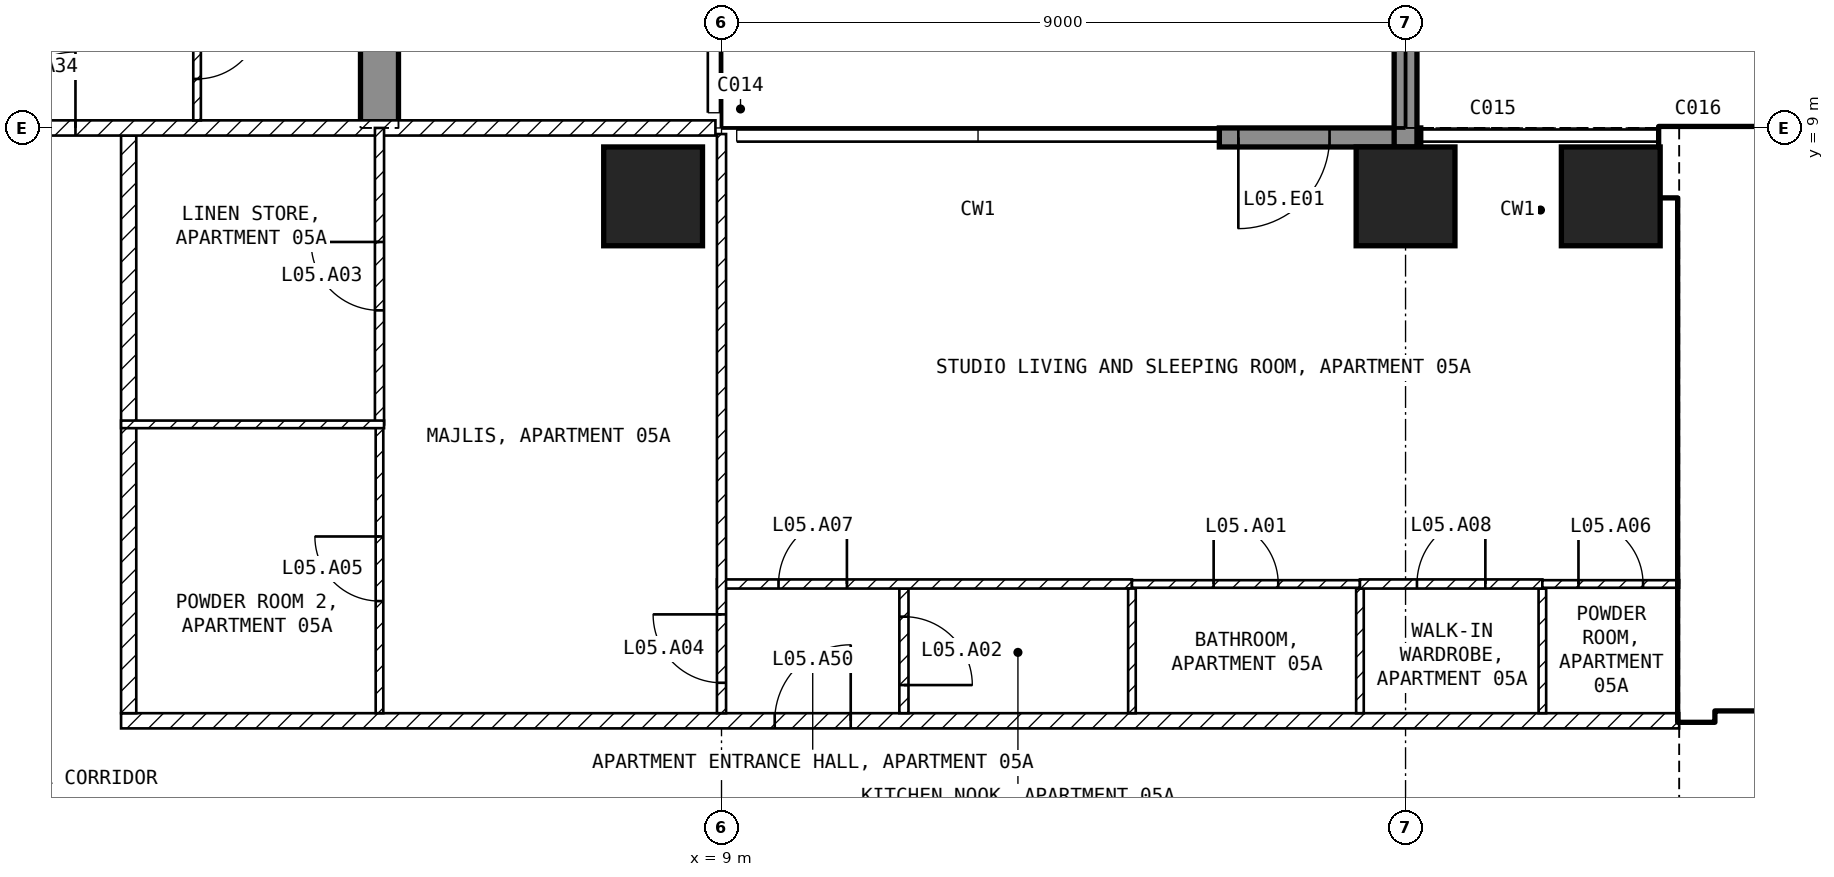
"""IFC4 building model, lengths in metres.
Left out: names, types, materials, properties, quantities, classifications, styles, units other than length and angle.
Written with IfcOpenShell. Run it as: python <this file> out.ifc"""

import sys

from ifc_helpers import new_model, si_unit, direction, frame, frame_2d, origin, origin_2d, place, context, subcontext, project, spatial, polyline, rectangle, outline, extrude, element, fill, save


model = new_model("IFC4")
c1 = context("Model", 3, precision=1e-05, world=origin(), true_north=direction((0.0, 1.0)))
c2 = subcontext(c1, "Body", "Model", "MODEL_VIEW")
j1 = project(units=[si_unit("LENGTHUNIT", "METRE"), si_unit("PLANEANGLEUNIT", "RADIAN")], contexts=[c1])
p1 = place(None, origin())
s1 = spatial("IfcSite", under=j1, at=p1, CompositionType="ELEMENT")
p2 = place(p1, origin())
s2 = spatial("IfcBuilding", under=s1, at=p2, CompositionType="ELEMENT")
p3 = place(p2, frame((0.0, 0.0, 36.5)))
s3 = spatial("IfcBuildingStorey", under=s2, at=p3, CompositionType="ELEMENT", Elevation=36.5)
for number, where, z_axis, x_axis in (
    (1, (8.1, 8.1, -0.25), (0.0, 0.0, 1.0), (1.0, 0.0, 0.0)),
    (2, (18.0, 8.1, -0.25), (0.0, 0.0, 1.0), (1.0, 0.0, 0.0)),
    (3, (20.7, 8.1, -0.25), (0.0, 0.0, 1.0), (1.0, 0.0, 0.0)),
):
    element("IfcColumn", number, at=place(p3, frame(where, z_axis=z_axis, x_axis=x_axis)), inside=s3, PredefinedType="COLUMN", context=c2, shape_type="SweptSolid", body=[
        extrude(rectangle(XDim=1.3, YDim=1.3, at=origin_2d()), origin(), (0.0, 0.0, 1.0), 3.5),
    ])
p4 = place(p3, frame((4.25, 9.0, -0.25), z_axis=(1.0, 0.0, 0.0), x_axis=(0.0, 1.0, 0.0)))
e4 = element("IfcWall", 4, at=p4, inside=s3, PredefinedType="SHEAR", context=c2, shape_type="SweptSolid", body=[
    extrude(outline(polyline([(0.0, 0.0), (2.1, 0.0), (2.1, 2.65), (4.5, 2.65), (4.5, 0.0), (9.9, 0.0), (9.9, 2.65), (12.3, 2.65), (12.3, 0.0), (16.45, 0.0), (16.45, 3.5), (0.0, 3.5), (0.0, 0.0)])), origin(), (0.0, 0.0, 1.0), 0.5),
])
p5 = place(p3, frame((18.2, 8.875, 0.0), z_axis=(0.0, 0.0, 1.0), x_axis=(-1.0, 0.0, 0.0)))
e5 = element("IfcWall", 5, at=p5, inside=s3, PredefinedType="SOLIDWALL", context=c2, shape_type="SweptSolid", body=[
    extrude(rectangle(XDim=2.65, YDim=0.25, at=frame_2d((1.325, 0.0))), origin(), (0.0, 0.0, 1.0), 3.25),
])
p6 = place(p5, frame((1.2, 0.0, 0.0)))
e6 = element("IfcOpeningElement", 6, at=p6, cuts=e5, PredefinedType="OPENING", context=c2, shape_type="SweptSolid", body=[
    extrude(rectangle(XDim=1.2, YDim=2.4, at=frame_2d((0.6, 1.2))), frame((0.0, 0.135, 0.0), z_axis=(0.0, -1.0, 0.0), x_axis=(1.0, 0.0, 0.0)), (0.0, 0.0, 1.0), 0.27),
])
p7 = place(p3, frame((18.0, 8.75, 0.0), z_axis=(0.0, 0.0, 1.0), x_axis=(0.0, 1.0, 0.0)))
e7 = element("IfcWall", 7, at=p7, inside=s3, PredefinedType="SOLIDWALL", context=c2, shape_type="SweptSolid", body=[
    extrude(rectangle(XDim=2.95, YDim=0.3, at=frame_2d((1.475, 0.0))), origin(), (0.0, 0.0, 1.0), 3.25),
])
p8 = place(p3, frame((21.35, 8.55, 0.0), z_axis=(0.0, 0.0, 1.0), x_axis=(1.0, 0.0, 0.0)))
e8 = element("IfcWall", 8, at=p8, inside=s3, PredefinedType="SHEAR", context=c2, shape_type="SweptSolid", body=[
    extrude(rectangle(XDim=10.15, YDim=0.9, at=frame_2d((5.075, 0.0))), origin(), (0.0, 0.0, 1.0), 3.25),
])
p9 = place(p3, frame((21.825, 1.2, 0.0), z_axis=(0.0, 0.0, 1.0), x_axis=(0.0, 1.0, 0.0)))
e9 = element("IfcWall", 9, at=p9, inside=s3, PredefinedType="SHEAR", context=c2, shape_type="SweptSolid", body=[
    extrude(rectangle(XDim=6.9, YDim=0.45, at=frame_2d((3.45, 0.0))), origin(), (0.0, 0.0, 1.0), 3.25),
])
p10 = place(p3, frame((22.05, 1.45, 0.0), z_axis=(0.0, 0.0, 1.0), x_axis=(1.0, 0.0, 0.0)))
e10 = element("IfcWall", 10, at=p10, inside=s3, PredefinedType="SOLIDWALL", context=c2, shape_type="SweptSolid", body=[
    extrude(rectangle(XDim=13.05, YDim=0.2, at=frame_2d((6.525, 0.0))), origin(), (0.0, 0.0, 1.0), 3.25),
])
p11 = place(p10, frame((0.75, 0.0, 0.0)))
e11 = element("IfcOpeningElement", 11, at=p11, cuts=e10, PredefinedType="OPENING", context=c2, shape_type="SweptSolid", body=[
    extrude(rectangle(XDim=1.0, YDim=2.1, at=frame_2d((0.5, 1.05))), frame((0.0, 0.11, 0.0), z_axis=(0.0, -1.0, 0.0), x_axis=(1.0, 0.0, 0.0)), (0.0, 0.0, 1.0), 0.22),
])
p12 = place(p10, frame((3.25, 0.0, 0.0)))
e12 = element("IfcOpeningElement", 12, at=p12, cuts=e10, PredefinedType="OPENING", context=c2, shape_type="SweptSolid", body=[
    extrude(rectangle(XDim=1.0, YDim=2.1, at=frame_2d((0.5, 1.05))), frame((0.0, 0.11, 0.0), z_axis=(0.0, -1.0, 0.0), x_axis=(1.0, 0.0, 0.0)), (0.0, 0.0, 1.0), 0.22),
])
p13 = place(p3, frame((22.05, 5.15, 0.0), z_axis=(0.0, 0.0, 1.0), x_axis=(1.0, 0.0, 0.0)))
e13 = element("IfcWall", 13, at=p13, inside=s3, PredefinedType="SOLIDWALL", context=c2, shape_type="SweptSolid", body=[
    extrude(rectangle(XDim=6.3, YDim=0.2, at=frame_2d((3.15, 0.0))), origin(), (0.0, 0.0, 1.0), 3.25),
])
p14 = place(p13, frame((0.2, 0.0, 0.0)))
e14 = element("IfcOpeningElement", 14, at=p14, cuts=e13, PredefinedType="OPENING", context=c2, shape_type="SweptSolid", body=[
    extrude(rectangle(XDim=1.0, YDim=2.1, at=frame_2d((0.5, 1.05))), frame((0.0, 0.11, 0.0), z_axis=(0.0, -1.0, 0.0), x_axis=(1.0, 0.0, 0.0)), (0.0, 0.0, 1.0), 0.22),
])
p15 = place(p3, frame((1.1, 1.2, 0.0), z_axis=(0.0, 0.0, 1.0), x_axis=(1.0, 0.0, 0.0)))
e15 = element("IfcWall", 15, at=p15, inside=s3, PredefinedType="PARTITIONING", context=c2, shape_type="SweptSolid", body=[
    extrude(rectangle(XDim=20.5, YDim=0.2, at=frame_2d((10.25, 0.0))), origin(), (0.0, 0.0, 1.0), 3.25),
])
p16 = place(p15, frame((8.6, 0.0, 0.0)))
e16 = element("IfcOpeningElement", 16, at=p16, cuts=e15, PredefinedType="OPENING", context=c2, shape_type="SweptSolid", body=[
    extrude(rectangle(XDim=1.0, YDim=2.1, at=frame_2d((0.5, 1.05))), frame((0.0, 0.11, 0.0), z_axis=(0.0, -1.0, 0.0), x_axis=(1.0, 0.0, 0.0)), (0.0, 0.0, 1.0), 0.22),
])
p17 = place(p3, frame((1.2, 8.9, 0.0), z_axis=(0.0, 0.0, 1.0), x_axis=(0.0, -1.0, 0.0)))
e17 = element("IfcWall", 17, at=p17, inside=s3, PredefinedType="PARTITIONING", context=c2, shape_type="SweptSolid", body=[
    extrude(rectangle(XDim=7.6, YDim=0.2, at=frame_2d((3.8, 0.0))), origin(), (0.0, 0.0, 1.0), 3.25),
])
p18 = place(p3, frame((-8.92, 9.0, 0.0), z_axis=(0.0, 0.0, 1.0), x_axis=(1.0, 0.0, 0.0)))
e18 = element("IfcWall", 18, at=p18, inside=s3, PredefinedType="PARTITIONING", context=c2, shape_type="SweptSolid", body=[
    extrude(rectangle(XDim=17.84, YDim=0.2, at=frame_2d((8.92, 0.0))), origin(), (0.0, 0.0, 1.0), 3.25),
])
p19 = place(p18, frame((8.42, 0.0, 0.0)))
e19 = element("IfcOpeningElement", 19, at=p19, cuts=e18, PredefinedType="OPENING", context=c2, shape_type="SweptSolid", body=[
    extrude(rectangle(XDim=1.0, YDim=2.1, at=frame_2d((0.5, 1.05))), frame((0.0, 0.11, 0.0), z_axis=(0.0, -1.0, 0.0), x_axis=(1.0, 0.0, 0.0)), (0.0, 0.0, 1.0), 0.22),
])
p20 = place(p3, frame((11.4, 2.94, 0.0), z_axis=(0.0, 0.0, 1.0), x_axis=(0.0, -1.0, 0.0)))
e20 = element("IfcWall", 20, at=p20, inside=s3, PredefinedType="PARTITIONING", context=c2, shape_type="SweptSolid", body=[
    extrude(rectangle(XDim=1.64, YDim=0.12, at=frame_2d((0.82, 0.0))), origin(), (0.0, 0.0, 1.0), 3.25),
])
p21 = place(p20, frame((0.37, 0.0, 0.0)))
e21 = element("IfcOpeningElement", 21, at=p21, cuts=e20, PredefinedType="OPENING", context=c2, shape_type="SweptSolid", body=[
    extrude(rectangle(XDim=0.9, YDim=2.1, at=frame_2d((0.45, 1.05))), frame((0.0, 0.07, 0.0), z_axis=(0.0, -1.0, 0.0), x_axis=(1.0, 0.0, 0.0)), (0.0, 0.0, 1.0), 0.14),
])
p22 = place(p3, frame((8.94, 3.0, 0.0), z_axis=(0.0, 0.0, 1.0), x_axis=(1.0, 0.0, 0.0)))
e22 = element("IfcWall", 22, at=p22, inside=s3, PredefinedType="PARTITIONING", context=c2, shape_type="SweptSolid", body=[
    extrude(rectangle(XDim=5.46, YDim=0.12, at=frame_2d((2.73, 0.0))), origin(), (0.0, 0.0, 1.0), 3.25),
])
p23 = place(p22, frame((0.81, 0.0, 0.0)))
e23 = element("IfcOpeningElement", 23, at=p23, cuts=e22, PredefinedType="OPENING", context=c2, shape_type="SweptSolid", body=[
    extrude(rectangle(XDim=0.9, YDim=2.1, at=frame_2d((0.45, 1.05))), frame((0.0, 0.07, 0.0), z_axis=(0.0, -1.0, 0.0), x_axis=(1.0, 0.0, 0.0)), (0.0, 0.0, 1.0), 0.14),
])
p24 = place(p3, frame((9.0, 1.3, 0.0), z_axis=(0.0, 0.0, 1.0), x_axis=(0.0, 1.0, 0.0)))
e24 = element("IfcWall", 24, at=p24, inside=s3, PredefinedType="PARTITIONING", context=c2, shape_type="SweptSolid", body=[
    extrude(rectangle(XDim=7.62, YDim=0.12, at=frame_2d((3.81, 0.0))), origin(), (0.0, 0.0, 1.0), 3.25),
])
p25 = place(p24, frame((0.4, 0.0, 0.0)))
e25 = element("IfcOpeningElement", 25, at=p25, cuts=e24, PredefinedType="OPENING", context=c2, shape_type="SweptSolid", body=[
    extrude(rectangle(XDim=0.9, YDim=2.1, at=frame_2d((0.45, 1.05))), frame((0.0, 0.07, 0.0), z_axis=(0.0, -1.0, 0.0), x_axis=(1.0, 0.0, 0.0)), (0.0, 0.0, 1.0), 0.14),
])
for number, where, z_axis, x_axis in (
    (26, (14.4, 2.94, 0.0), (0.0, 0.0, 1.0), (0.0, -1.0, 0.0)),
    (27, (17.4, 2.94, 0.0), (0.0, 0.0, 1.0), (0.0, -1.0, 0.0)),
):
    element("IfcWall", number, at=place(p3, frame(where, z_axis=z_axis, x_axis=x_axis)), inside=s3, PredefinedType="PARTITIONING", context=c2, shape_type="SweptSolid", body=[
        extrude(rectangle(XDim=1.64, YDim=0.1, at=frame_2d((0.82, 0.0))), origin(), (0.0, 0.0, 1.0), 3.25),
    ])
p26 = place(p3, frame((14.4, 3.0, 0.0), z_axis=(0.0, 0.0, 1.0), x_axis=(1.0, 0.0, 0.0)))
e28 = element("IfcWall", 28, at=p26, inside=s3, PredefinedType="PARTITIONING", context=c2, shape_type="SweptSolid", body=[
    extrude(rectangle(XDim=3.0, YDim=0.1, at=frame_2d((1.5, 0.0))), origin(), (0.0, 0.0, 1.0), 3.25),
])
p27 = place(p26, frame((1.075, 0.0, 0.0)))
e29 = element("IfcOpeningElement", 29, at=p27, cuts=e28, PredefinedType="OPENING", context=c2, shape_type="SweptSolid", body=[
    extrude(rectangle(XDim=0.85, YDim=2.1, at=frame_2d((0.425, 1.05))), frame((0.0, 0.06, 0.0), z_axis=(0.0, -1.0, 0.0), x_axis=(1.0, 0.0, 0.0)), (0.0, 0.0, 1.0), 0.12),
])
p28 = place(p3, frame((19.8, 2.94, 0.0), z_axis=(0.0, 0.0, 1.0), x_axis=(0.0, -1.0, 0.0)))
e30 = element("IfcWall", 30, at=p28, inside=s3, PredefinedType="PARTITIONING", context=c2, shape_type="SweptSolid", body=[
    extrude(rectangle(XDim=1.64, YDim=0.1, at=frame_2d((0.82, 0.0))), origin(), (0.0, 0.0, 1.0), 3.25),
])
p29 = place(p3, frame((17.4, 3.0, 0.0), z_axis=(0.0, 0.0, 1.0), x_axis=(1.0, 0.0, 0.0)))
e31 = element("IfcWall", 31, at=p29, inside=s3, PredefinedType="PARTITIONING", context=c2, shape_type="SweptSolid", body=[
    extrude(rectangle(XDim=2.4, YDim=0.12, at=frame_2d((1.2, 0.0))), origin(), (0.0, 0.0, 1.0), 3.25),
])
p30 = place(p29, frame((0.75, 0.0, 0.0)))
e32 = element("IfcOpeningElement", 32, at=p30, cuts=e31, PredefinedType="OPENING", context=c2, shape_type="SweptSolid", body=[
    extrude(rectangle(XDim=0.9, YDim=2.1, at=frame_2d((0.45, 1.05))), frame((0.0, 0.07, 0.0), z_axis=(0.0, -1.0, 0.0), x_axis=(1.0, 0.0, 0.0)), (0.0, 0.0, 1.0), 0.14),
])
p31 = place(p3, frame((19.8, 3.0, 0.0), z_axis=(0.0, 0.0, 1.0), x_axis=(1.0, 0.0, 0.0)))
e33 = element("IfcWall", 33, at=p31, inside=s3, PredefinedType="PARTITIONING", context=c2, shape_type="SweptSolid", body=[
    extrude(rectangle(XDim=1.8, YDim=0.1, at=frame_2d((0.9, 0.0))), origin(), (0.0, 0.0, 1.0), 3.25),
])
p32 = place(p31, frame((0.475, 0.0, 0.0)))
e34 = element("IfcOpeningElement", 34, at=p32, cuts=e33, PredefinedType="OPENING", context=c2, shape_type="SweptSolid", body=[
    extrude(rectangle(XDim=0.85, YDim=2.1, at=frame_2d((0.425, 1.05))), frame((0.0, 0.06, 0.0), z_axis=(0.0, -1.0, 0.0), x_axis=(1.0, 0.0, 0.0)), (0.0, 0.0, 1.0), 0.12),
])
p33 = place(p3, frame((4.5, 1.3, 0.0), z_axis=(0.0, 0.0, 1.0), x_axis=(0.0, 1.0, 0.0)))
e35 = element("IfcWall", 35, at=p33, inside=s3, PredefinedType="PARTITIONING", context=c2, shape_type="SweptSolid", body=[
    extrude(rectangle(XDim=3.8, YDim=0.1, at=frame_2d((1.9, 0.0))), origin(), (0.0, 0.0, 1.0), 3.25),
])
p34 = place(p33, frame((1.475, 0.0, 0.0)))
e36 = element("IfcOpeningElement", 36, at=p34, cuts=e35, PredefinedType="OPENING", context=c2, shape_type="SweptSolid", body=[
    extrude(rectangle(XDim=0.85, YDim=2.1, at=frame_2d((0.425, 1.05))), frame((0.0, 0.06, 0.0), z_axis=(0.0, -1.0, 0.0), x_axis=(1.0, 0.0, 0.0)), (0.0, 0.0, 1.0), 0.12),
])
p35 = place(p3, frame((4.5, 5.1, 0.0), z_axis=(0.0, 0.0, 1.0), x_axis=(0.0, 1.0, 0.0)))
e37 = element("IfcWall", 37, at=p35, inside=s3, PredefinedType="PARTITIONING", context=c2, shape_type="SweptSolid", body=[
    extrude(rectangle(XDim=3.9, YDim=0.12, at=frame_2d((1.95, 0.0))), origin(), (0.0, 0.0, 1.0), 3.25),
])
p36 = place(p35, frame((1.5, 0.0, 0.0)))
e38 = element("IfcOpeningElement", 38, at=p36, cuts=e37, PredefinedType="OPENING", context=c2, shape_type="SweptSolid", body=[
    extrude(rectangle(XDim=0.9, YDim=2.1, at=frame_2d((0.45, 1.05))), frame((0.0, 0.07, 0.0), z_axis=(0.0, -1.0, 0.0), x_axis=(1.0, 0.0, 0.0)), (0.0, 0.0, 1.0), 0.14),
])
p37 = place(p3, frame((1.1, 5.1, 0.0), z_axis=(0.0, 0.0, 1.0), x_axis=(1.0, 0.0, 0.0)))
e39 = element("IfcWall", 39, at=p37, inside=s3, PredefinedType="PARTITIONING", context=c2, shape_type="SweptSolid", body=[
    extrude(rectangle(XDim=3.46, YDim=0.1, at=frame_2d((1.73, 0.0))), origin(), (0.0, 0.0, 1.0), 3.25),
])
p38 = place(p3, frame((2.1, 11.04, 0.0), z_axis=(0.0, 0.0, 1.0), x_axis=(0.0, -1.0, 0.0)))
e40 = element("IfcWall", 40, at=p38, inside=s3, PredefinedType="PARTITIONING", context=c2, shape_type="SweptSolid", body=[
    extrude(rectangle(XDim=1.94, YDim=0.1, at=frame_2d((0.97, 0.0))), origin(), (0.0, 0.0, 1.0), 3.25),
])
p39 = place(p38, frame((0.545, 0.0, 0.0)))
e41 = element("IfcOpeningElement", 41, at=p39, cuts=e40, PredefinedType="OPENING", context=c2, shape_type="SweptSolid", body=[
    extrude(rectangle(XDim=0.85, YDim=2.1, at=frame_2d((0.425, 1.05))), frame((0.0, 0.06, 0.0), z_axis=(0.0, -1.0, 0.0), x_axis=(1.0, 0.0, 0.0)), (0.0, 0.0, 1.0), 0.12),
])
p40 = place(p6, origin())
e42 = element("IfcDoor", 42, at=p40, inside=s3, OperationType="SINGLE_SWING_RIGHT", PredefinedType="DOOR", context=c2, shape_type="SweptSolid", body=[
    extrude(rectangle(XDim=1.2, YDim=2.4, at=frame_2d((0.6, 1.2))), frame((0.0, 0.025, 0.0), z_axis=(0.0, -1.0, 0.0), x_axis=(1.0, 0.0, 0.0)), (0.0, 0.0, 1.0), 0.05),
])
fill(e6, e42)
p41 = place(p14, origin())
e43 = element("IfcDoor", 43, at=p41, inside=s3, OperationType="SINGLE_SWING_LEFT", PredefinedType="DOOR", context=c2, shape_type="SweptSolid", body=[
    extrude(rectangle(XDim=1.0, YDim=2.1, at=frame_2d((0.5, 1.05))), frame((0.0, 0.025, 0.0), z_axis=(0.0, -1.0, 0.0), x_axis=(1.0, 0.0, 0.0)), (0.0, 0.0, 1.0), 0.05),
])
fill(e14, e43)
p42 = place(p27, origin())
e44 = element("IfcDoor", 44, at=p42, inside=s3, OperationType="SINGLE_SWING_LEFT", PredefinedType="DOOR", context=c2, shape_type="SweptSolid", body=[
    extrude(rectangle(XDim=0.85, YDim=2.1, at=frame_2d((0.425, 1.05))), frame((0.0, 0.025, 0.0), z_axis=(0.0, -1.0, 0.0), x_axis=(1.0, 0.0, 0.0)), (0.0, 0.0, 1.0), 0.05),
])
fill(e29, e44)
p43 = place(p21, origin())
e45 = element("IfcDoor", 45, at=p43, inside=s3, OperationType="SINGLE_SWING_RIGHT", PredefinedType="DOOR", context=c2, shape_type="SweptSolid", body=[
    extrude(rectangle(XDim=0.9, YDim=2.1, at=frame_2d((0.45, 1.05))), frame((0.0, 0.025, 0.0), z_axis=(0.0, -1.0, 0.0), x_axis=(1.0, 0.0, 0.0)), (0.0, 0.0, 1.0), 0.05),
])
fill(e21, e45)
p44 = place(p36, origin())
e46 = element("IfcDoor", 46, at=p44, inside=s3, OperationType="SINGLE_SWING_RIGHT", PredefinedType="DOOR", context=c2, shape_type="SweptSolid", body=[
    extrude(rectangle(XDim=0.9, YDim=2.1, at=frame_2d((0.45, 1.05))), frame((0.0, 0.025, 0.0), z_axis=(0.0, -1.0, 0.0), x_axis=(1.0, 0.0, 0.0)), (0.0, 0.0, 1.0), 0.05),
])
fill(e38, e46)
p45 = place(p25, origin())
e47 = element("IfcDoor", 47, at=p45, inside=s3, OperationType="SINGLE_SWING_RIGHT", PredefinedType="DOOR", context=c2, shape_type="SweptSolid", body=[
    extrude(rectangle(XDim=0.9, YDim=2.1, at=frame_2d((0.45, 1.05))), frame((0.0, 0.025, 0.0), z_axis=(0.0, -1.0, 0.0), x_axis=(1.0, 0.0, 0.0)), (0.0, 0.0, 1.0), 0.05),
])
fill(e25, e47)
p46 = place(p34, origin())
e48 = element("IfcDoor", 48, at=p46, inside=s3, OperationType="SINGLE_SWING_RIGHT", PredefinedType="DOOR", context=c2, shape_type="SweptSolid", body=[
    extrude(rectangle(XDim=0.85, YDim=2.1, at=frame_2d((0.425, 1.05))), frame((0.0, 0.025, 0.0), z_axis=(0.0, -1.0, 0.0), x_axis=(1.0, 0.0, 0.0)), (0.0, 0.0, 1.0), 0.05),
])
fill(e36, e48)
p47 = place(p32, origin())
e49 = element("IfcDoor", 49, at=p47, inside=s3, OperationType="SINGLE_SWING_LEFT", PredefinedType="DOOR", context=c2, shape_type="SweptSolid", body=[
    extrude(rectangle(XDim=0.85, YDim=2.1, at=frame_2d((0.425, 1.05))), frame((0.0, 0.025, 0.0), z_axis=(0.0, -1.0, 0.0), x_axis=(1.0, 0.0, 0.0)), (0.0, 0.0, 1.0), 0.05),
])
fill(e34, e49)
p48 = place(p23, origin())
e50 = element("IfcDoor", 50, at=p48, inside=s3, OperationType="SINGLE_SWING_RIGHT", PredefinedType="DOOR", context=c2, shape_type="SweptSolid", body=[
    extrude(rectangle(XDim=0.9, YDim=2.1, at=frame_2d((0.45, 1.05))), frame((0.0, 0.025, 0.0), z_axis=(0.0, -1.0, 0.0), x_axis=(1.0, 0.0, 0.0)), (0.0, 0.0, 1.0), 0.05),
])
fill(e23, e50)
p49 = place(p30, origin())
e51 = element("IfcDoor", 51, at=p49, inside=s3, OperationType="SINGLE_SWING_RIGHT", PredefinedType="DOOR", context=c2, shape_type="SweptSolid", body=[
    extrude(rectangle(XDim=0.9, YDim=2.1, at=frame_2d((0.45, 1.05))), frame((0.0, 0.025, 0.0), z_axis=(0.0, -1.0, 0.0), x_axis=(1.0, 0.0, 0.0)), (0.0, 0.0, 1.0), 0.05),
])
fill(e32, e51)
p50 = place(p19, origin())
e52 = element("IfcDoor", 52, at=p50, inside=s3, OperationType="SINGLE_SWING_RIGHT", PredefinedType="DOOR", context=c2, shape_type="SweptSolid", body=[
    extrude(rectangle(XDim=1.0, YDim=2.1, at=frame_2d((0.5, 1.05))), frame((0.0, 0.025, 0.0), z_axis=(0.0, -1.0, 0.0), x_axis=(1.0, 0.0, 0.0)), (0.0, 0.0, 1.0), 0.05),
])
fill(e19, e52)
p51 = place(p39, origin())
e53 = element("IfcDoor", 53, at=p51, inside=s3, OperationType="SINGLE_SWING_LEFT", PredefinedType="DOOR", context=c2, shape_type="SweptSolid", body=[
    extrude(rectangle(XDim=0.85, YDim=2.1, at=frame_2d((0.425, 1.05))), frame((0.0, 0.025, 0.0), z_axis=(0.0, -1.0, 0.0), x_axis=(1.0, 0.0, 0.0)), (0.0, 0.0, 1.0), 0.05),
])
fill(e41, e53)
p52 = place(p16, origin())
e54 = element("IfcDoor", 54, at=p52, inside=s3, OperationType="SINGLE_SWING_RIGHT", PredefinedType="DOOR", context=c2, shape_type="SweptSolid", body=[
    extrude(rectangle(XDim=1.0, YDim=2.1, at=frame_2d((0.5, 1.05))), frame((0.0, 0.025, 0.0), z_axis=(0.0, -1.0, 0.0), x_axis=(1.0, 0.0, 0.0)), (0.0, 0.0, 1.0), 0.05),
])
fill(e16, e54)
save(model, sys.argv[1])
